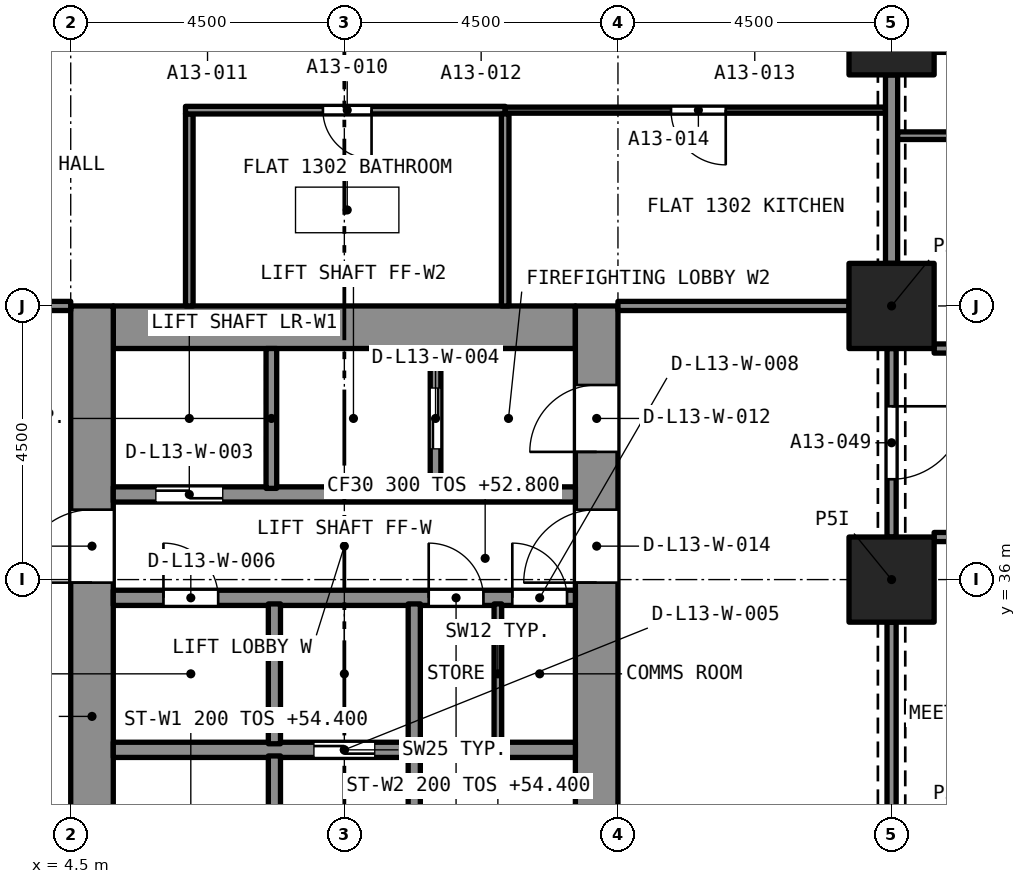
"""IFC4 building model, lengths in metres.
Left out: names, types, materials, properties, quantities, classifications, styles, units other than length and angle.
Written with IfcOpenShell. Run it as: python <this file> out.ifc"""

import sys

from ifc_helpers import new_model, si_unit, direction, frame, frame_2d, origin, origin_2d, place, context, subcontext, project, spatial, rectangle, extrude, element, fill, save


model = new_model("IFC4")
c1 = context("Model", 3, precision=1e-05, world=origin(), true_north=direction((0.0, 1.0)))
c2 = subcontext(c1, "Body", "Model", "MODEL_VIEW")
j1 = project(units=[si_unit("LENGTHUNIT", "METRE"), si_unit("PLANEANGLEUNIT", "RADIAN")], contexts=[c1])
p1 = place(None, origin())
s1 = spatial("IfcSite", under=j1, at=p1, CompositionType="ELEMENT")
p2 = place(p1, origin())
s2 = spatial("IfcBuilding", under=s1, at=p2, CompositionType="ELEMENT")
p3 = place(p2, frame((0.0, 0.0, 52.8)))
s3 = spatial("IfcBuildingStorey", under=s2, at=p3, CompositionType="ELEMENT", Elevation=52.8)
for number, where, z_axis, x_axis in (
    (1, (18.0, 36.0, 0.0), (0.0, 0.0, 1.0), (1.0, 0.0, 0.0)),
    (2, (18.0, 40.5, 0.0), (0.0, 0.0, 1.0), (1.0, 0.0, 0.0)),
    (3, (18.0, 45.0, 0.0), (0.0, 0.0, 1.0), (1.0, 0.0, 0.0)),
):
    element("IfcColumn", number, at=place(p3, frame(where, z_axis=z_axis, x_axis=x_axis)), inside=s3, PredefinedType="COLUMN", context=c2, shape_type="SweptSolid", body=[
        extrude(rectangle(XDim=1.4, YDim=1.4, at=origin_2d()), origin(), (0.0, 0.0, 1.0), 3.2),
    ])
p4 = place(p3, frame((5.2, 40.15, 0.0), z_axis=(0.0, 0.0, 1.0), x_axis=(1.0, 0.0, 0.0)))
e4 = element("IfcWall", 4, at=p4, inside=s3, PredefinedType="SOLIDWALL", context=c2, shape_type="SweptSolid", body=[
    extrude(rectangle(XDim=7.6, YDim=0.7, at=frame_2d((3.8, 0.0))), origin(), (0.0, 0.0, 1.0), 3.2),
])
p5 = place(p3, frame((4.85, 27.0, 0.0), z_axis=(0.0, 0.0, 1.0), x_axis=(0.0, 1.0, 0.0)))
e5 = element("IfcWall", 5, at=p5, inside=s3, PredefinedType="SOLIDWALL", context=c2, shape_type="SweptSolid", body=[
    extrude(rectangle(XDim=13.5, YDim=0.7, at=frame_2d((6.75, 0.0))), origin(), (0.0, 0.0, 1.0), 3.2),
])
p6 = place(p5, frame((8.95, 0.0, 0.0)))
e6 = element("IfcOpeningElement", 6, at=p6, cuts=e5, PredefinedType="OPENING", context=c2, shape_type="SweptSolid", body=[
    extrude(rectangle(XDim=1.2, YDim=2.1, at=frame_2d((0.6, 1.05))), frame((0.0, 0.36, 0.0), z_axis=(0.0, -1.0, 0.0), x_axis=(1.0, 0.0, 0.0)), (0.0, 0.0, 1.0), 0.72),
])
p7 = place(p3, frame((13.15, 27.0, 0.0), z_axis=(0.0, 0.0, 1.0), x_axis=(0.0, 1.0, 0.0)))
e7 = element("IfcWall", 7, at=p7, inside=s3, PredefinedType="SOLIDWALL", context=c2, shape_type="SweptSolid", body=[
    extrude(rectangle(XDim=13.5, YDim=0.7, at=frame_2d((6.75, 0.0))), origin(), (0.0, 0.0, 1.0), 3.2),
])
p8 = place(p7, frame((11.1, 0.0, 0.0)))
e8 = element("IfcOpeningElement", 8, at=p8, cuts=e7, PredefinedType="OPENING", context=c2, shape_type="SweptSolid", body=[
    extrude(rectangle(XDim=1.1, YDim=2.1, at=frame_2d((0.55, 1.05))), frame((0.0, 0.36, 0.0), z_axis=(0.0, -1.0, 0.0), x_axis=(1.0, 0.0, 0.0)), (0.0, 0.0, 1.0), 0.72),
])
p9 = place(p7, frame((8.95, 0.0, 0.0)))
e9 = element("IfcOpeningElement", 9, at=p9, cuts=e7, PredefinedType="OPENING", context=c2, shape_type="SweptSolid", body=[
    extrude(rectangle(XDim=1.2, YDim=2.1, at=frame_2d((0.6, 1.05))), frame((0.0, 0.36, 0.0), z_axis=(0.0, -1.0, 0.0), x_axis=(1.0, 0.0, 0.0)), (0.0, 0.0, 1.0), 0.72),
])
p10 = place(p3, frame((6.45, 40.5, 0.0), z_axis=(0.0, 0.0, 1.0), x_axis=(0.0, 1.0, 0.0)))
e10 = element("IfcWall", 10, at=p10, inside=s3, PredefinedType="PARTITIONING", context=c2, shape_type="SweptSolid", body=[
    extrude(rectangle(XDim=3.157, YDim=0.125, at=frame_2d((1.579, 0.0))), origin(), (0.0, 0.0, 1.0), 2.9),
])
p11 = place(p3, frame((11.645, 43.72, 0.0), z_axis=(0.0, 0.0, 1.0), x_axis=(-1.0, 0.0, 0.0)))
e11 = element("IfcWall", 11, at=p11, inside=s3, PredefinedType="PARTITIONING", context=c2, shape_type="SweptSolid", body=[
    extrude(rectangle(XDim=5.258, YDim=0.125, at=frame_2d((2.629, 0.0))), origin(), (0.0, 0.0, 1.0), 2.9),
])
p12 = place(p11, frame((2.198, 0.0, 0.0)))
e12 = element("IfcOpeningElement", 12, at=p12, cuts=e11, PredefinedType="OPENING", context=c2, shape_type="SweptSolid", body=[
    extrude(rectangle(XDim=0.8, YDim=2.1, at=frame_2d((0.4, 1.05))), frame((0.0, 0.073, 0.0), z_axis=(0.0, -1.0, 0.0), x_axis=(1.0, 0.0, 0.0)), (0.0, 0.0, 1.0), 0.145),
])
p13 = place(p3, frame((11.645, 40.5, 0.0), z_axis=(0.0, 0.0, 1.0), x_axis=(0.0, 1.0, 0.0)))
e13 = element("IfcWall", 13, at=p13, inside=s3, PredefinedType="PARTITIONING", context=c2, shape_type="SweptSolid", body=[
    extrude(rectangle(XDim=3.157, YDim=0.125, at=frame_2d((1.579, 0.0))), origin(), (0.0, 0.0, 1.0), 2.9),
])
p14 = place(p3, frame((17.9, 43.72, 0.0), z_axis=(0.0, 0.0, 1.0), x_axis=(-1.0, 0.0, 0.0)))
e14 = element("IfcWall", 14, at=p14, inside=s3, PredefinedType="PARTITIONING", context=c2, shape_type="SweptSolid", body=[
    extrude(rectangle(XDim=6.255, YDim=0.1, at=frame_2d((3.127, 0.0))), origin(), (0.0, 0.0, 1.0), 2.9),
])
p15 = place(p14, frame((2.627, 0.0, 0.0)))
e15 = element("IfcOpeningElement", 15, at=p15, cuts=e14, PredefinedType="OPENING", context=c2, shape_type="SweptSolid", body=[
    extrude(rectangle(XDim=0.9, YDim=2.1, at=frame_2d((0.45, 1.05))), frame((0.0, 0.06, 0.0), z_axis=(0.0, -1.0, 0.0), x_axis=(1.0, 0.0, 0.0)), (0.0, 0.0, 1.0), 0.12),
])
p16 = place(p3, frame((0.7, 40.5, 0.0), z_axis=(0.0, 0.0, 1.0), x_axis=(1.0, 0.0, 0.0)))
e16 = element("IfcWall", 16, at=p16, inside=s3, PredefinedType="PARTITIONING", context=c2, shape_type="SweptSolid", body=[
    extrude(rectangle(XDim=3.8, YDim=0.15, at=frame_2d((1.9, 0.0))), origin(), (0.0, 0.0, 1.0), 2.9),
])
p17 = place(p16, frame((1.05, 0.0, 0.0)))
e17 = element("IfcOpeningElement", 17, at=p17, cuts=e16, PredefinedType="OPENING", context=c2, shape_type="SweptSolid", body=[
    extrude(rectangle(XDim=1.0, YDim=2.1, at=frame_2d((0.5, 1.05))), frame((0.0, 0.085, 0.0), z_axis=(0.0, -1.0, 0.0), x_axis=(1.0, 0.0, 0.0)), (0.0, 0.0, 1.0), 0.17),
])
p18 = place(p3, frame((18.0, 41.2, 0.0), z_axis=(0.0, 0.0, 1.0), x_axis=(0.0, 1.0, 0.0)))
e18 = element("IfcWall", 18, at=p18, inside=s3, PredefinedType="PARTITIONING", context=c2, shape_type="SweptSolid", body=[
    extrude(rectangle(XDim=3.1, YDim=0.2, at=frame_2d((1.55, 0.0))), origin(), (0.0, 0.0, 1.0), 2.38),
])
p19 = place(p3, frame((13.5, 40.5, 0.0), z_axis=(0.0, 0.0, 1.0), x_axis=(1.0, 0.0, 0.0)))
e19 = element("IfcWall", 19, at=p19, inside=s3, PredefinedType="PARTITIONING", context=c2, shape_type="SweptSolid", body=[
    extrude(rectangle(XDim=3.8, YDim=0.15, at=frame_2d((1.9, 0.0))), origin(), (0.0, 0.0, 1.0), 2.9),
])
p20 = place(p3, frame((24.212, 43.3, 0.0), z_axis=(0.0, 0.0, 1.0), x_axis=(-1.0, 0.0, 0.0)))
e20 = element("IfcWall", 20, at=p20, inside=s3, PredefinedType="PARTITIONING", context=c2, shape_type="SweptSolid", body=[
    extrude(rectangle(XDim=6.112, YDim=0.125, at=frame_2d((3.056, 0.0))), origin(), (0.0, 0.0, 1.0), 2.75),
])
p21 = place(p20, frame((2.738, 0.0, 0.0)))
e21 = element("IfcOpeningElement", 21, at=p21, cuts=e20, PredefinedType="OPENING", context=c2, shape_type="SweptSolid", body=[
    extrude(rectangle(XDim=0.8, YDim=2.1, at=frame_2d((0.4, 1.05))), frame((0.0, 0.073, 0.0), z_axis=(0.0, -1.0, 0.0), x_axis=(1.0, 0.0, 0.0)), (0.0, 0.0, 1.0), 0.145),
])
p22 = place(p3, frame((18.7, 39.8, 0.0), z_axis=(0.0, 0.0, 1.0), x_axis=(1.0, 0.0, 0.0)))
e22 = element("IfcWall", 22, at=p22, inside=s3, PredefinedType="PARTITIONING", context=c2, shape_type="SweptSolid", body=[
    extrude(rectangle(XDim=5.45, YDim=0.15, at=frame_2d((2.725, 0.0))), origin(), (0.0, 0.0, 1.0), 2.75),
])
p23 = place(p3, frame((22.5, 36.7, 0.0), z_axis=(0.0, 0.0, 1.0), x_axis=(-1.0, 0.0, 0.0)))
e23 = element("IfcWall", 23, at=p23, inside=s3, PredefinedType="PARTITIONING", context=c2, shape_type="SweptSolid", body=[
    extrude(rectangle(XDim=3.8, YDim=0.15, at=frame_2d((1.9, 0.0))), origin(), (0.0, 0.0, 1.0), 2.75),
])
p24 = place(p23, frame((1.75, 0.0, 0.0)))
e24 = element("IfcOpeningElement", 24, at=p24, cuts=e23, PredefinedType="OPENING", context=c2, shape_type="SweptSolid", body=[
    extrude(rectangle(XDim=1.0, YDim=2.1, at=frame_2d((0.5, 1.05))), frame((0.0, 0.085, 0.0), z_axis=(0.0, -1.0, 0.0), x_axis=(1.0, 0.0, 0.0)), (0.0, 0.0, 1.0), 0.17),
])
p25 = place(p3, frame((18.0, 39.8, 0.0), z_axis=(0.0, 0.0, 1.0), x_axis=(0.0, -1.0, 0.0)))
e25 = element("IfcWall", 25, at=p25, inside=s3, PredefinedType="PARTITIONING", context=c2, shape_type="SweptSolid", body=[
    extrude(rectangle(XDim=3.1, YDim=0.15, at=frame_2d((1.55, 0.0))), origin(), (0.0, 0.0, 1.0), 2.38),
])
p26 = place(p25, frame((0.95, 0.0, 0.0)))
e26 = element("IfcOpeningElement", 26, at=p26, cuts=e25, PredefinedType="OPENING", context=c2, shape_type="SweptSolid", body=[
    extrude(rectangle(XDim=1.2, YDim=2.1, at=frame_2d((0.6, 1.05))), frame((0.0, 0.085, 0.0), z_axis=(0.0, -1.0, 0.0), x_axis=(1.0, 0.0, 0.0)), (0.0, 0.0, 1.0), 0.17),
])
p27 = place(p3, frame((18.0, 32.2, 0.0), z_axis=(0.0, 0.0, 1.0), x_axis=(0.0, 1.0, 0.0)))
e27 = element("IfcWall", 27, at=p27, inside=s3, PredefinedType="PARTITIONING", context=c2, shape_type="SweptSolid", body=[
    extrude(rectangle(XDim=3.1, YDim=0.15, at=frame_2d((1.55, 0.0))), origin(), (0.0, 0.0, 1.0), 2.38),
])
p28 = place(p3, frame((5.2, 33.2, 0.0), z_axis=(0.0, 0.0, 1.0), x_axis=(1.0, 0.0, 0.0)))
e28 = element("IfcWall", 28, at=p28, inside=s3, PredefinedType="SOLIDWALL", context=c2, shape_type="SweptSolid", body=[
    extrude(rectangle(XDim=7.6, YDim=0.25, at=frame_2d((3.8, 0.0))), origin(), (0.0, 0.0, 1.0), 2.9),
])
p29 = place(p28, frame((3.3, 0.0, 0.0)))
e29 = element("IfcOpeningElement", 29, at=p29, cuts=e28, PredefinedType="OPENING", context=c2, shape_type="SweptSolid", body=[
    extrude(rectangle(XDim=1.0, YDim=2.1, at=frame_2d((0.5, 1.05))), frame((0.0, 0.135, 0.0), z_axis=(0.0, -1.0, 0.0), x_axis=(1.0, 0.0, 0.0)), (0.0, 0.0, 1.0), 0.27),
])
p30 = place(p3, frame((5.2, 35.7, 0.0), z_axis=(0.0, 0.0, 1.0), x_axis=(1.0, 0.0, 0.0)))
e30 = element("IfcWall", 30, at=p30, inside=s3, PredefinedType="SOLIDWALL", context=c2, shape_type="SweptSolid", body=[
    extrude(rectangle(XDim=7.6, YDim=0.25, at=frame_2d((3.8, 0.0))), origin(), (0.0, 0.0, 1.0), 2.9),
])
p31 = place(p30, frame((0.825, 0.0, 0.0)))
e31 = element("IfcOpeningElement", 31, at=p31, cuts=e30, PredefinedType="OPENING", context=c2, shape_type="SweptSolid", body=[
    extrude(rectangle(XDim=0.9, YDim=2.1, at=frame_2d((0.45, 1.05))), frame((0.0, 0.135, 0.0), z_axis=(0.0, -1.0, 0.0), x_axis=(1.0, 0.0, 0.0)), (0.0, 0.0, 1.0), 0.27),
])
p32 = place(p30, frame((5.188, 0.0, 0.0)))
e32 = element("IfcOpeningElement", 32, at=p32, cuts=e30, PredefinedType="OPENING", context=c2, shape_type="SweptSolid", body=[
    extrude(rectangle(XDim=0.9, YDim=2.1, at=frame_2d((0.45, 1.05))), frame((0.0, 0.135, 0.0), z_axis=(0.0, -1.0, 0.0), x_axis=(1.0, 0.0, 0.0)), (0.0, 0.0, 1.0), 0.27),
])
p33 = place(p30, frame((6.562, 0.0, 0.0)))
e33 = element("IfcOpeningElement", 33, at=p33, cuts=e30, PredefinedType="OPENING", context=c2, shape_type="SweptSolid", body=[
    extrude(rectangle(XDim=0.9, YDim=2.1, at=frame_2d((0.45, 1.05))), frame((0.0, 0.135, 0.0), z_axis=(0.0, -1.0, 0.0), x_axis=(1.0, 0.0, 0.0)), (0.0, 0.0, 1.0), 0.27),
])
p34 = place(p3, frame((5.2, 37.4, 0.0), z_axis=(0.0, 0.0, 1.0), x_axis=(1.0, 0.0, 0.0)))
e34 = element("IfcWall", 34, at=p34, inside=s3, PredefinedType="SOLIDWALL", context=c2, shape_type="SweptSolid", body=[
    extrude(rectangle(XDim=7.6, YDim=0.25, at=frame_2d((3.8, 0.0))), origin(), (0.0, 0.0, 1.0), 2.9),
])
p35 = place(p34, frame((0.7, 0.0, 0.0)))
e35 = element("IfcOpeningElement", 35, at=p35, cuts=e34, PredefinedType="OPENING", context=c2, shape_type="SweptSolid", body=[
    extrude(rectangle(XDim=1.1, YDim=2.4, at=frame_2d((0.55, 1.2))), frame((0.0, 0.135, 0.0), z_axis=(0.0, -1.0, 0.0), x_axis=(1.0, 0.0, 0.0)), (0.0, 0.0, 1.0), 0.27),
])
p36 = place(p3, frame((7.85, 27.7, 0.0), z_axis=(0.0, 0.0, 1.0), x_axis=(0.0, 1.0, 0.0)))
e36 = element("IfcWall", 36, at=p36, inside=s3, PredefinedType="SOLIDWALL", context=c2, shape_type="SweptSolid", body=[
    extrude(rectangle(XDim=5.4, YDim=0.2, at=frame_2d((2.7, 0.0))), origin(), (0.0, 0.0, 1.0), 2.9),
])
p37 = place(p36, frame((0.2, 0.0, 0.0)))
e37 = element("IfcOpeningElement", 37, at=p37, cuts=e36, PredefinedType="OPENING", context=c2, shape_type="SweptSolid", body=[
    extrude(rectangle(XDim=0.9, YDim=2.1, at=frame_2d((0.45, 1.05))), frame((0.0, 0.11, 0.0), z_axis=(0.0, -1.0, 0.0), x_axis=(1.0, 0.0, 0.0)), (0.0, 0.0, 1.0), 0.22),
])
p38 = place(p3, frame((10.15, 27.7, 0.0), z_axis=(0.0, 0.0, 1.0), x_axis=(0.0, 1.0, 0.0)))
e38 = element("IfcWall", 38, at=p38, inside=s3, PredefinedType="SOLIDWALL", context=c2, shape_type="SweptSolid", body=[
    extrude(rectangle(XDim=5.4, YDim=0.2, at=frame_2d((2.7, 0.0))), origin(), (0.0, 0.0, 1.0), 2.9),
])
p39 = place(p38, frame((0.2, 0.0, 0.0)))
e39 = element("IfcOpeningElement", 39, at=p39, cuts=e38, PredefinedType="OPENING", context=c2, shape_type="SweptSolid", body=[
    extrude(rectangle(XDim=0.9, YDim=2.1, at=frame_2d((0.45, 1.05))), frame((0.0, 0.11, 0.0), z_axis=(0.0, -1.0, 0.0), x_axis=(1.0, 0.0, 0.0)), (0.0, 0.0, 1.0), 0.22),
])
for number, where, z_axis, x_axis in (
    (40, (7.85, 33.3, 0.0), (0.0, 0.0, 1.0), (0.0, 1.0, 0.0)),
    (41, (10.15, 33.3, 0.0), (0.0, 0.0, 1.0), (0.0, 1.0, 0.0)),
):
    element("IfcWall", number, at=place(p3, frame(where, z_axis=z_axis, x_axis=x_axis)), inside=s3, PredefinedType="SOLIDWALL", context=c2, shape_type="SweptSolid", body=[
        extrude(rectangle(XDim=2.3, YDim=0.2, at=frame_2d((1.15, 0.0))), origin(), (0.0, 0.0, 1.0), 2.9),
    ])
p40 = place(p3, frame((7.8, 37.5, 0.0), z_axis=(0.0, 0.0, 1.0), x_axis=(0.0, 1.0, 0.0)))
e42 = element("IfcWall", 42, at=p40, inside=s3, PredefinedType="SOLIDWALL", context=c2, shape_type="SweptSolid", body=[
    extrude(rectangle(XDim=2.3, YDim=0.175, at=frame_2d((1.15, 0.0))), origin(), (0.0, 0.0, 1.0), 2.9),
])
p41 = place(p3, frame((10.5, 37.5, 0.0), z_axis=(0.0, 0.0, 1.0), x_axis=(0.0, 1.0, 0.0)))
e43 = element("IfcWall", 43, at=p41, inside=s3, PredefinedType="SOLIDWALL", context=c2, shape_type="SweptSolid", body=[
    extrude(rectangle(XDim=2.3, YDim=0.175, at=frame_2d((1.15, 0.0))), origin(), (0.0, 0.0, 1.0), 2.9),
])
p42 = place(p41, frame((0.65, 0.0, 0.0)))
e44 = element("IfcOpeningElement", 44, at=p42, cuts=e43, PredefinedType="OPENING", context=c2, shape_type="SweptSolid", body=[
    extrude(rectangle(XDim=1.0, YDim=2.1, at=frame_2d((0.5, 1.05))), frame((0.0, 0.097, 0.0), z_axis=(0.0, -1.0, 0.0), x_axis=(1.0, 0.0, 0.0)), (0.0, 0.0, 1.0), 0.195),
])
p43 = place(p3, frame((11.525, 33.3, 0.0), z_axis=(0.0, 0.0, 1.0), x_axis=(0.0, 1.0, 0.0)))
e45 = element("IfcWall", 45, at=p43, inside=s3, PredefinedType="PARTITIONING", context=c2, shape_type="SweptSolid", body=[
    extrude(rectangle(XDim=2.3, YDim=0.125, at=frame_2d((1.15, 0.0))), origin(), (0.0, 0.0, 1.0), 2.9),
])
p44 = place(p12, origin())
e46 = element("IfcDoor", 46, at=p44, inside=s3, OperationType="SINGLE_SWING_LEFT", PredefinedType="DOOR", context=c2, shape_type="SweptSolid", body=[
    extrude(rectangle(XDim=0.8, YDim=2.1, at=frame_2d((0.4, 1.05))), frame((0.0, 0.025, 0.0), z_axis=(0.0, -1.0, 0.0), x_axis=(1.0, 0.0, 0.0)), (0.0, 0.0, 1.0), 0.05),
])
fill(e12, e46)
p45 = place(p15, origin())
e47 = element("IfcDoor", 47, at=p45, inside=s3, OperationType="SINGLE_SWING_LEFT", PredefinedType="DOOR", context=c2, shape_type="SweptSolid", body=[
    extrude(rectangle(XDim=0.9, YDim=2.1, at=frame_2d((0.45, 1.05))), frame((0.0, 0.025, 0.0), z_axis=(0.0, -1.0, 0.0), x_axis=(1.0, 0.0, 0.0)), (0.0, 0.0, 1.0), 0.05),
])
fill(e15, e47)
p46 = place(p26, origin())
e48 = element("IfcDoor", 48, at=p46, inside=s3, OperationType="SINGLE_SWING_LEFT", PredefinedType="DOOR", context=c2, shape_type="SweptSolid", body=[
    extrude(rectangle(XDim=1.2, YDim=2.1, at=frame_2d((0.6, 1.05))), frame((0.0, 0.025, 0.0), z_axis=(0.0, -1.0, 0.0), x_axis=(1.0, 0.0, 0.0)), (0.0, 0.0, 1.0), 0.05),
])
fill(e26, e48)
p47 = place(p35, origin())
e49 = element("IfcDoor", 49, at=p47, inside=s3, OperationType="SLIDING_TO_LEFT", PredefinedType="DOOR", context=c2, shape_type="SweptSolid", body=[
    extrude(rectangle(XDim=1.1, YDim=2.4, at=frame_2d((0.55, 1.2))), frame((0.0, 0.025, 0.0), z_axis=(0.0, -1.0, 0.0), x_axis=(1.0, 0.0, 0.0)), (0.0, 0.0, 1.0), 0.05),
])
fill(e35, e49)
p48 = place(p42, origin())
e50 = element("IfcDoor", 50, at=p48, inside=s3, OperationType="SLIDING_TO_LEFT", PredefinedType="DOOR", context=c2, shape_type="SweptSolid", body=[
    extrude(rectangle(XDim=1.0, YDim=2.1, at=frame_2d((0.5, 1.05))), frame((0.0, 0.025, 0.0), z_axis=(0.0, -1.0, 0.0), x_axis=(1.0, 0.0, 0.0)), (0.0, 0.0, 1.0), 0.05),
])
fill(e44, e50)
p49 = place(p29, origin())
e51 = element("IfcDoor", 51, at=p49, inside=s3, OperationType="SLIDING_TO_LEFT", PredefinedType="DOOR", context=c2, shape_type="SweptSolid", body=[
    extrude(rectangle(XDim=1.0, YDim=2.1, at=frame_2d((0.5, 1.05))), frame((0.0, 0.025, 0.0), z_axis=(0.0, -1.0, 0.0), x_axis=(1.0, 0.0, 0.0)), (0.0, 0.0, 1.0), 0.05),
])
fill(e29, e51)
p50 = place(p31, origin())
e52 = element("IfcDoor", 52, at=p50, inside=s3, OperationType="SINGLE_SWING_LEFT", PredefinedType="DOOR", context=c2, shape_type="SweptSolid", body=[
    extrude(rectangle(XDim=0.9, YDim=2.1, at=frame_2d((0.45, 1.05))), frame((0.0, 0.025, 0.0), z_axis=(0.0, -1.0, 0.0), x_axis=(1.0, 0.0, 0.0)), (0.0, 0.0, 1.0), 0.05),
])
fill(e31, e52)
p51 = place(p32, origin())
e53 = element("IfcDoor", 53, at=p51, inside=s3, OperationType="SINGLE_SWING_LEFT", PredefinedType="DOOR", context=c2, shape_type="SweptSolid", body=[
    extrude(rectangle(XDim=0.9, YDim=2.1, at=frame_2d((0.45, 1.05))), frame((0.0, 0.025, 0.0), z_axis=(0.0, -1.0, 0.0), x_axis=(1.0, 0.0, 0.0)), (0.0, 0.0, 1.0), 0.05),
])
fill(e32, e53)
p52 = place(p33, origin())
e54 = element("IfcDoor", 54, at=p52, inside=s3, OperationType="SINGLE_SWING_LEFT", PredefinedType="DOOR", context=c2, shape_type="SweptSolid", body=[
    extrude(rectangle(XDim=0.9, YDim=2.1, at=frame_2d((0.45, 1.05))), frame((0.0, 0.025, 0.0), z_axis=(0.0, -1.0, 0.0), x_axis=(1.0, 0.0, 0.0)), (0.0, 0.0, 1.0), 0.05),
])
fill(e33, e54)
p53 = place(p8, origin())
e55 = element("IfcDoor", 55, at=p53, inside=s3, OperationType="SINGLE_SWING_LEFT", PredefinedType="DOOR", context=c2, shape_type="SweptSolid", body=[
    extrude(rectangle(XDim=1.1, YDim=2.1, at=frame_2d((0.55, 1.05))), frame((0.0, 0.025, 0.0), z_axis=(0.0, -1.0, 0.0), x_axis=(1.0, 0.0, 0.0)), (0.0, 0.0, 1.0), 0.05),
])
fill(e8, e55)
p54 = place(p6, origin())
e56 = element("IfcDoor", 56, at=p54, inside=s3, OperationType="SINGLE_SWING_LEFT", PredefinedType="DOOR", context=c2, shape_type="SweptSolid", body=[
    extrude(rectangle(XDim=1.2, YDim=2.1, at=frame_2d((0.6, 1.05))), frame((0.0, 0.025, 0.0), z_axis=(0.0, -1.0, 0.0), x_axis=(1.0, 0.0, 0.0)), (0.0, 0.0, 1.0), 0.05),
])
fill(e6, e56)
p55 = place(p9, origin())
e57 = element("IfcDoor", 57, at=p55, inside=s3, OperationType="SINGLE_SWING_LEFT", PredefinedType="DOOR", context=c2, shape_type="SweptSolid", body=[
    extrude(rectangle(XDim=1.2, YDim=2.1, at=frame_2d((0.6, 1.05))), frame((0.0, 0.025, 0.0), z_axis=(0.0, -1.0, 0.0), x_axis=(1.0, 0.0, 0.0)), (0.0, 0.0, 1.0), 0.05),
])
fill(e9, e57)
save(model, sys.argv[1])
